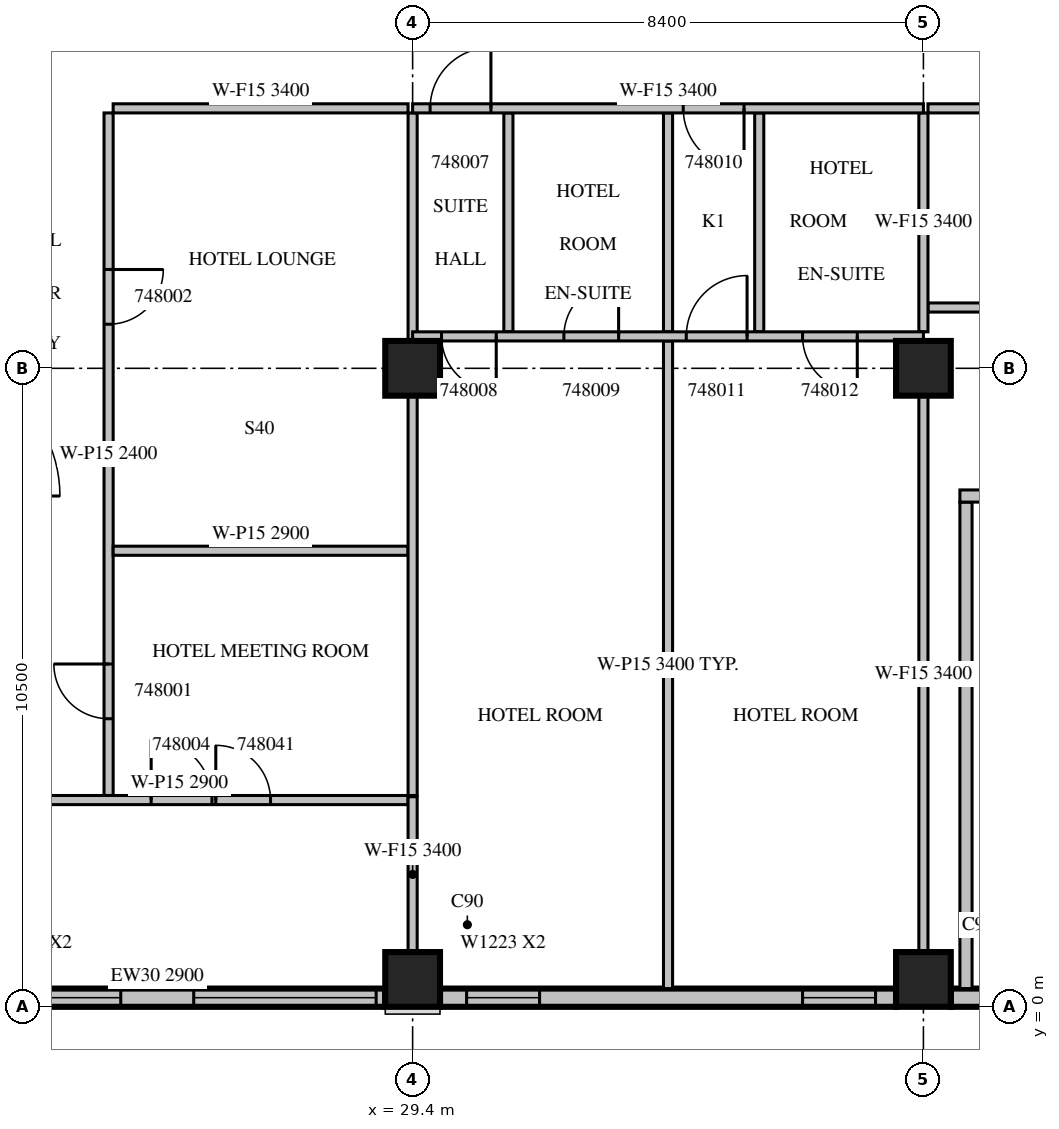
"""IFC4 building model, lengths in metres.
Left out: names, types, materials, properties, quantities, classifications, styles, units other than length and angle.
Written with IfcOpenShell. Run it as: python <this file> out.ifc"""

import sys

from ifc_helpers import new_model, si_unit, direction, frame, frame_2d, origin, origin_2d, place, context, subcontext, project, spatial, rectangle, extrude, source, transform, mapped, element, fill, save


model = new_model("IFC4")
c1 = context("Model", 3, precision=1e-05, world=origin(), true_north=direction((0.0, 1.0)))
c2 = subcontext(c1, "Body", "Model", "MODEL_VIEW")
j1 = project(units=[si_unit("LENGTHUNIT", "METRE"), si_unit("PLANEANGLEUNIT", "RADIAN")], contexts=[c1])
p1 = place(None, origin())
s1 = spatial("IfcSite", under=j1, at=p1, CompositionType="ELEMENT")
p2 = place(p1, origin())
s2 = spatial("IfcBuilding", under=s1, at=p2, CompositionType="ELEMENT")
p3 = place(p2, frame((0.0, 0.0, 215.8)))
s3 = spatial("IfcBuildingStorey", under=s2, at=p3, CompositionType="ELEMENT", Elevation=215.8)
m1 = source(origin(), c2, "Body", "SweptSolid", [
    extrude(rectangle(XDim=0.9, YDim=0.9, at=origin_2d()), origin(), (0.0, 0.0, 1.0), 3.8),
])
for number, where, z_axis, x_axis in (
    (1, (29.4, 0.45, 0.0), (0.0, 0.0, 1.0), (1.0, 0.0, 0.0)),
    (2, (37.8, 0.45, 0.0), (0.0, 0.0, 1.0), (1.0, 0.0, 0.0)),
    (3, (29.4, 10.5, 0.0), (0.0, 0.0, 1.0), (1.0, 0.0, 0.0)),
    (4, (37.8, 10.5, 0.0), (0.0, 0.0, 1.0), (1.0, 0.0, 0.0)),
):
    element("IfcColumn", number, at=place(p3, frame(where, z_axis=z_axis, x_axis=x_axis)), inside=s3, PredefinedType="COLUMN", context=c2, shape_type="MappedRepresentation", body=[
        mapped(m1, transform((0.0, 0.0, 0.0), scale=1.0)),
    ])
m2 = source(origin(), c2, "Body", "SweptSolid", [
    extrude(rectangle(XDim=7.5, YDim=0.3, at=frame_2d((3.75, 0.0))), origin(), (0.0, 0.0, 1.0), 2.9),
])
p4 = place(p3, frame((21.45, 0.15, 0.0), z_axis=(0.0, 0.0, 1.0), x_axis=(1.0, 0.0, 0.0)))
e5 = element("IfcWall", 5, at=p4, inside=s3, PredefinedType="STANDARD", context=c2, shape_type="MappedRepresentation", body=[
    mapped(m2, transform((0.0, 0.0, 0.0), scale=1.0)),
])
m3 = source(origin(), c2, "Body", "SweptSolid", [
    extrude(rectangle(XDim=3.0, YDim=2.3, at=frame_2d((1.5, 1.15))), frame((0.0, 0.16, 0.0), z_axis=(0.0, -1.0, 0.0), x_axis=(1.0, 0.0, 0.0)), (0.0, 0.0, 1.0), 0.32),
])
p5 = place(p4, frame((0.15, 0.0, 0.6)))
e6 = element("IfcOpeningElement", 6, at=p5, cuts=e5, PredefinedType="OPENING", context=c2, shape_type="MappedRepresentation", body=[
    mapped(m3, transform((0.0, 0.0, 0.0), scale=1.0)),
])
p6 = place(p4, frame((4.35, 0.0, 0.6)))
e7 = element("IfcOpeningElement", 7, at=p6, cuts=e5, PredefinedType="OPENING", context=c2, shape_type="MappedRepresentation", body=[
    mapped(m3, transform((0.0, 0.0, 0.0), scale=1.0)),
])
m4 = source(origin(), c2, "Body", "SweptSolid", [
    extrude(rectangle(XDim=7.5, YDim=0.3, at=frame_2d((3.75, 0.0))), origin(), (0.0, 0.0, 1.0), 3.4),
])
p7 = place(p3, frame((29.85, 0.15, 0.0), z_axis=(0.0, 0.0, 1.0), x_axis=(1.0, 0.0, 0.0)))
e8 = element("IfcWall", 8, at=p7, inside=s3, PredefinedType="STANDARD", context=c2, shape_type="MappedRepresentation", body=[
    mapped(m4, transform((0.0, 0.0, 0.0), scale=1.0)),
])
m5 = source(origin(), c2, "Body", "SweptSolid", [
    extrude(rectangle(XDim=1.2, YDim=2.3, at=frame_2d((0.6, 1.15))), frame((0.0, 0.16, 0.0), z_axis=(0.0, -1.0, 0.0), x_axis=(1.0, 0.0, 0.0)), (0.0, 0.0, 1.0), 0.32),
])
p8 = place(p7, frame((0.438, 0.0, 0.6)))
e9 = element("IfcOpeningElement", 9, at=p8, cuts=e8, PredefinedType="OPENING", context=c2, shape_type="MappedRepresentation", body=[
    mapped(m5, transform((0.0, 0.0, 0.0), scale=1.0)),
])
p9 = place(p7, frame((5.963, 0.0, 0.6)))
e10 = element("IfcOpeningElement", 10, at=p9, cuts=e8, PredefinedType="OPENING", context=c2, shape_type="MappedRepresentation", body=[
    mapped(m5, transform((0.0, 0.0, 0.0), scale=1.0)),
])
m6 = source(origin(), c2, "Body", "SweptSolid", [
    extrude(rectangle(XDim=1.95, YDim=0.3, at=frame_2d((0.975, 0.0))), origin(), (0.0, 0.0, 1.0), 3.4),
])
p10 = place(p3, frame((38.25, 0.15, 0.0), z_axis=(0.0, 0.0, 1.0), x_axis=(1.0, 0.0, 0.0)))
e11 = element("IfcWall", 11, at=p10, inside=s3, PredefinedType="STANDARD", context=c2, shape_type="MappedRepresentation", body=[
    mapped(m6, transform((0.0, 0.0, 0.0), scale=1.0)),
])
m7 = source(origin(), c2, "Body", "SweptSolid", [
    extrude(rectangle(XDim=8.0, YDim=0.2, at=frame_2d((4.0, 0.0))), origin(), (0.0, 0.0, 1.0), 3.4),
])
p11 = place(p3, frame((38.5, 0.3, 0.0), z_axis=(0.0, 0.0, 1.0), x_axis=(0.0, 1.0, 0.0)))
e12 = element("IfcWall", 12, at=p11, inside=s3, PredefinedType="PARTITIONING", context=c2, shape_type="MappedRepresentation", body=[
    mapped(m7, transform((0.0, 0.0, 0.0), scale=1.0)),
])
m8 = source(origin(), c2, "Body", "SweptSolid", [
    extrude(rectangle(XDim=5.45, YDim=0.2, at=frame_2d((2.725, 0.0))), origin(), (0.0, 0.0, 1.0), 3.4),
])
p12 = place(p3, frame((38.4, 8.4, 0.0), z_axis=(0.0, 0.0, 1.0), x_axis=(1.0, 0.0, 0.0)))
e13 = element("IfcWall", 13, at=p12, inside=s3, PredefinedType="PARTITIONING", context=c2, shape_type="MappedRepresentation", body=[
    mapped(m8, transform((0.0, 0.0, 0.0), scale=1.0)),
])
m9 = source(origin(), c2, "Body", "SweptSolid", [
    extrude(rectangle(XDim=1.2, YDim=2.1, at=frame_2d((0.6, 1.05))), frame((0.0, 0.11, 0.0), z_axis=(0.0, -1.0, 0.0), x_axis=(1.0, 0.0, 0.0)), (0.0, 0.0, 1.0), 0.22),
])
p13 = place(p12, frame((0.4, 0.0, 0.0)))
e14 = element("IfcOpeningElement", 14, at=p13, cuts=e13, PredefinedType="OPENING", context=c2, shape_type="MappedRepresentation", body=[
    mapped(m9, transform((0.0, 0.0, 0.0), scale=1.0)),
])
m10 = source(origin(), c2, "Body", "SweptSolid", [
    extrude(rectangle(XDim=0.9, YDim=2.1, at=frame_2d((0.45, 1.05))), frame((0.0, 0.11, 0.0), z_axis=(0.0, -1.0, 0.0), x_axis=(1.0, 0.0, 0.0)), (0.0, 0.0, 1.0), 0.22),
])
p14 = place(p12, frame((3.25, 0.0, 0.0)))
e15 = element("IfcOpeningElement", 15, at=p14, cuts=e13, PredefinedType="OPENING", context=c2, shape_type="MappedRepresentation", body=[
    mapped(m10, transform((0.0, 0.0, 0.0), scale=1.0)),
])
m11 = source(origin(), c2, "Body", "SweptSolid", [
    extrude(rectangle(XDim=11.225, YDim=0.15, at=frame_2d((5.612, 0.0))), origin(), (0.0, 0.0, 1.0), 2.4),
])
p15 = place(p3, frame((24.4, 14.7, 0.0), z_axis=(0.0, 0.0, 1.0), x_axis=(0.0, -1.0, 0.0)))
e16 = element("IfcWall", 16, at=p15, inside=s3, PredefinedType="PARTITIONING", context=c2, shape_type="MappedRepresentation", body=[
    mapped(m11, transform((0.0, 0.0, 0.0), scale=1.0)),
])
m12 = source(origin(), c2, "Body", "SweptSolid", [
    extrude(rectangle(XDim=0.9, YDim=2.1, at=frame_2d((0.45, 1.05))), frame((0.0, 0.085, 0.0), z_axis=(0.0, -1.0, 0.0), x_axis=(1.0, 0.0, 0.0)), (0.0, 0.0, 1.0), 0.17),
])
p16 = place(p15, frame((9.062, 0.0, 0.0)))
e17 = element("IfcOpeningElement", 17, at=p16, cuts=e16, PredefinedType="OPENING", context=c2, shape_type="MappedRepresentation", body=[
    mapped(m12, transform((0.0, 0.0, 0.0), scale=1.0)),
])
p17 = place(p15, frame((2.575, 0.0, 0.0)))
e18 = element("IfcOpeningElement", 18, at=p17, cuts=e16, PredefinedType="OPENING", context=c2, shape_type="MappedRepresentation", body=[
    mapped(m12, transform((0.0, 0.0, 0.0), scale=1.0)),
])
m13 = source(origin(), c2, "Body", "SweptSolid", [
    extrude(rectangle(XDim=4.85, YDim=0.15, at=frame_2d((2.425, 0.0))), origin(), (0.0, 0.0, 1.0), 2.9),
])
p18 = place(p3, frame((29.325, 7.5, 0.0), z_axis=(0.0, 0.0, 1.0), x_axis=(-1.0, 0.0, 0.0)))
e19 = element("IfcWall", 19, at=p18, inside=s3, PredefinedType="PARTITIONING", context=c2, shape_type="MappedRepresentation", body=[
    mapped(m13, transform((0.0, 0.0, 0.0), scale=1.0)),
])
m14 = source(origin(), c2, "Body", "SweptSolid", [
    extrude(rectangle(XDim=4.85, YDim=0.15, at=frame_2d((2.425, 0.0))), origin(), (0.0, 0.0, 1.0), 3.4),
])
p19 = place(p3, frame((29.325, 14.775, 0.0), z_axis=(0.0, 0.0, 1.0), x_axis=(-1.0, 0.0, 0.0)))
e20 = element("IfcWall", 20, at=p19, inside=s3, PredefinedType="PARTITIONING", context=c2, shape_type="MappedRepresentation", body=[
    mapped(m14, transform((0.0, 0.0, 0.0), scale=1.0)),
])
m15 = source(origin(), c2, "Body", "SweptSolid", [
    extrude(rectangle(XDim=6.576, YDim=0.15, at=frame_2d((3.288, 0.0))), origin(), (0.0, 0.0, 1.0), 3.4),
])
p20 = place(p3, frame((29.4, 3.475, 0.0), z_axis=(0.0, 0.0, 1.0), x_axis=(0.0, 1.0, 0.0)))
e21 = element("IfcWall", 21, at=p20, inside=s3, PredefinedType="PARTITIONING", context=c2, shape_type="MappedRepresentation", body=[
    mapped(m15, transform((0.0, 0.0, 0.0), scale=1.0)),
])
m16 = source(origin(), c2, "Body", "SweptSolid", [
    extrude(rectangle(XDim=3.751, YDim=0.15, at=frame_2d((1.875, 0.0))), origin(), (0.0, 0.0, 1.0), 3.4),
])
p21 = place(p3, frame((29.4, 10.949, 0.0), z_axis=(0.0, 0.0, 1.0), x_axis=(0.0, 1.0, 0.0)))
e22 = element("IfcWall", 22, at=p21, inside=s3, PredefinedType="PARTITIONING", context=c2, shape_type="MappedRepresentation", body=[
    mapped(m16, transform((0.0, 0.0, 0.0), scale=1.0)),
])
m17 = source(origin(), c2, "Body", "SweptSolid", [
    extrude(rectangle(XDim=7.525, YDim=0.15, at=frame_2d((3.763, 0.0))), origin(), (0.0, 0.0, 1.0), 2.9),
])
p22 = place(p3, frame((21.8, 3.4, 0.0), z_axis=(0.0, 0.0, 1.0), x_axis=(1.0, 0.0, 0.0)))
e23 = element("IfcWall", 23, at=p22, inside=s3, PredefinedType="PARTITIONING", context=c2, shape_type="MappedRepresentation", body=[
    mapped(m17, transform((0.0, 0.0, 0.0), scale=1.0)),
])
m18 = source(origin(), c2, "Body", "SweptSolid", [
    extrude(rectangle(XDim=1.0, YDim=2.1, at=frame_2d((0.5, 1.05))), frame((0.0, 0.085, 0.0), z_axis=(0.0, -1.0, 0.0), x_axis=(1.0, 0.0, 0.0)), (0.0, 0.0, 1.0), 0.17),
])
p23 = place(p22, frame((3.3, 0.0, 0.0)))
e24 = element("IfcOpeningElement", 24, at=p23, cuts=e23, PredefinedType="OPENING", context=c2, shape_type="MappedRepresentation", body=[
    mapped(m18, transform((0.0, 0.0, 0.0), scale=1.0)),
])
p24 = place(p22, frame((4.363, 0.0, 0.0)))
e25 = element("IfcOpeningElement", 25, at=p24, cuts=e23, PredefinedType="OPENING", context=c2, shape_type="MappedRepresentation", body=[
    mapped(m12, transform((0.0, 0.0, 0.0), scale=1.0)),
])
m19 = source(origin(), c2, "Body", "SweptSolid", [
    extrude(rectangle(XDim=6.45, YDim=0.15, at=frame_2d((3.225, 0.0))), origin(), (0.0, 0.0, 1.0), 3.4),
])
p25 = place(p3, frame((37.875, 11.5, 0.0), z_axis=(0.0, 0.0, 1.0), x_axis=(1.0, 0.0, 0.0)))
e26 = element("IfcWall", 26, at=p25, inside=s3, PredefinedType="PARTITIONING", context=c2, shape_type="MappedRepresentation", body=[
    mapped(m19, transform((0.0, 0.0, 0.0), scale=1.0)),
])
p26 = place(p3, frame((44.325, 14.775, 0.0), z_axis=(0.0, 0.0, 1.0), x_axis=(-1.0, 0.0, 0.0)))
e27 = element("IfcWall", 27, at=p26, inside=s3, PredefinedType="PARTITIONING", context=c2, shape_type="MappedRepresentation", body=[
    mapped(m19, transform((0.0, 0.0, 0.0), scale=1.0)),
])
p27 = place(p26, frame((2.812, 0.0, 0.0)))
e28 = element("IfcOpeningElement", 28, at=p27, cuts=e27, PredefinedType="OPENING", context=c2, shape_type="MappedRepresentation", body=[
    mapped(m12, transform((0.0, 0.0, 0.0), scale=1.0)),
])
m20 = source(origin(), c2, "Body", "SweptSolid", [
    extrude(rectangle(XDim=10.65, YDim=0.15, at=frame_2d((5.325, 0.0))), origin(), (0.0, 0.0, 1.0), 3.4),
])
p28 = place(p3, frame((33.6, 0.3, 0.0), z_axis=(0.0, 0.0, 1.0), x_axis=(0.0, 1.0, 0.0)))
e29 = element("IfcWall", 29, at=p28, inside=s3, PredefinedType="PARTITIONING", context=c2, shape_type="MappedRepresentation", body=[
    mapped(m20, transform((0.0, 0.0, 0.0), scale=1.0)),
])
m21 = source(origin(), c2, "Body", "SweptSolid", [
    extrude(rectangle(XDim=3.6, YDim=0.15, at=frame_2d((1.8, 0.0))), origin(), (0.0, 0.0, 1.0), 3.4),
])
for number, where, z_axis, x_axis in (
    (30, (30.975, 11.1, 0.0), (0.0, 0.0, 1.0), (0.0, 1.0, 0.0)),
    (31, (33.6, 11.1, 0.0), (0.0, 0.0, 1.0), (0.0, 1.0, 0.0)),
    (32, (35.1, 11.1, 0.0), (0.0, 0.0, 1.0), (0.0, 1.0, 0.0)),
):
    element("IfcWall", number, at=place(p3, frame(where, z_axis=z_axis, x_axis=x_axis)), inside=s3, PredefinedType="PARTITIONING", context=c2, shape_type="MappedRepresentation", body=[
        mapped(m21, transform((0.0, 0.0, 0.0), scale=1.0)),
    ])
m22 = source(origin(), c2, "Body", "SweptSolid", [
    extrude(rectangle(XDim=2.556, YDim=0.15, at=frame_2d((1.278, 0.0))), origin(), (0.0, 0.0, 1.0), 3.4),
])
p29 = place(p3, frame((29.4, 0.899, 0.0), z_axis=(0.0, 0.0, 1.0), x_axis=(0.0, 1.0, 0.0)))
e33 = element("IfcWall", 33, at=p29, inside=s3, PredefinedType="PARTITIONING", context=c2, shape_type="MappedRepresentation", body=[
    mapped(m22, transform((0.0, 0.0, 0.0), scale=1.0)),
])
m23 = source(origin(), c2, "Body", "SweptSolid", [
    extrude(rectangle(XDim=9.152, YDim=0.15, at=frame_2d((4.576, 0.0))), origin(), (0.0, 0.0, 1.0), 3.4),
])
p30 = place(p3, frame((37.8, 0.899, 0.0), z_axis=(0.0, 0.0, 1.0), x_axis=(0.0, 1.0, 0.0)))
e34 = element("IfcWall", 34, at=p30, inside=s3, PredefinedType="PARTITIONING", context=c2, shape_type="MappedRepresentation", body=[
    mapped(m23, transform((0.0, 0.0, 0.0), scale=1.0)),
])
p31 = place(p3, frame((37.8, 11.1, 0.0), z_axis=(0.0, 0.0, 1.0), x_axis=(0.0, 1.0, 0.0)))
e35 = element("IfcWall", 35, at=p31, inside=s3, PredefinedType="PARTITIONING", context=c2, shape_type="MappedRepresentation", body=[
    mapped(m21, transform((0.0, 0.0, 0.0), scale=1.0)),
])
m24 = source(origin(), c2, "Body", "SweptSolid", [
    extrude(rectangle(XDim=8.4, YDim=0.15, at=frame_2d((4.2, 0.0))), origin(), (0.0, 0.0, 1.0), 3.4),
])
p32 = place(p3, frame((37.8, 11.025, 0.0), z_axis=(0.0, 0.0, 1.0), x_axis=(-1.0, 0.0, 0.0)))
e36 = element("IfcWall", 36, at=p32, inside=s3, PredefinedType="PARTITIONING", context=c2, shape_type="MappedRepresentation", body=[
    mapped(m24, transform((0.0, 0.0, 0.0), scale=1.0)),
])
p33 = place(p32, frame((7.025, 0.0, 0.0)))
e37 = element("IfcOpeningElement", 37, at=p33, cuts=e36, PredefinedType="OPENING", context=c2, shape_type="MappedRepresentation", body=[
    mapped(m12, transform((0.0, 0.0, 0.0), scale=1.0)),
])
p34 = place(p32, frame((5.013, 0.0, 0.0)))
e38 = element("IfcOpeningElement", 38, at=p34, cuts=e36, PredefinedType="OPENING", context=c2, shape_type="MappedRepresentation", body=[
    mapped(m12, transform((0.0, 0.0, 0.0), scale=1.0)),
])
p35 = place(p32, frame((2.9, 0.0, 0.0)))
e39 = element("IfcOpeningElement", 39, at=p35, cuts=e36, PredefinedType="OPENING", context=c2, shape_type="MappedRepresentation", body=[
    mapped(m18, transform((0.0, 0.0, 0.0), scale=1.0)),
])
p36 = place(p32, frame((1.087, 0.0, 0.0)))
e40 = element("IfcOpeningElement", 40, at=p36, cuts=e36, PredefinedType="OPENING", context=c2, shape_type="MappedRepresentation", body=[
    mapped(m12, transform((0.0, 0.0, 0.0), scale=1.0)),
])
p37 = place(p3, frame((37.8, 14.775, 0.0), z_axis=(0.0, 0.0, 1.0), x_axis=(-1.0, 0.0, 0.0)))
e41 = element("IfcWall", 41, at=p37, inside=s3, PredefinedType="PARTITIONING", context=c2, shape_type="MappedRepresentation", body=[
    mapped(m24, transform((0.0, 0.0, 0.0), scale=1.0)),
])
p38 = place(p37, frame((7.112, 0.0, 0.0)))
e42 = element("IfcOpeningElement", 42, at=p38, cuts=e41, PredefinedType="OPENING", context=c2, shape_type="MappedRepresentation", body=[
    mapped(m18, transform((0.0, 0.0, 0.0), scale=1.0)),
])
p39 = place(p37, frame((2.95, 0.0, 0.0)))
e43 = element("IfcOpeningElement", 43, at=p39, cuts=e41, PredefinedType="OPENING", context=c2, shape_type="MappedRepresentation", body=[
    mapped(m18, transform((0.0, 0.0, 0.0), scale=1.0)),
])
m25 = source(origin(), c2, "Body", "SweptSolid", [
    extrude(rectangle(XDim=3.0, YDim=2.3, at=frame_2d((1.5, 1.15))), frame((0.0, 0.03, 0.0), z_axis=(0.0, -1.0, 0.0), x_axis=(1.0, 0.0, 0.0)), (0.0, 0.0, 1.0), 0.06),
])
p40 = place(p5, origin())
e44 = element("IfcWindow", 44, at=p40, inside=s3, PartitioningType="SINGLE_PANEL", PredefinedType="WINDOW", context=c2, shape_type="MappedRepresentation", body=[
    mapped(m25, transform((0.0, 0.0, 0.0), scale=1.0)),
])
fill(e6, e44)
p41 = place(p6, origin())
e45 = element("IfcWindow", 45, at=p41, inside=s3, PartitioningType="SINGLE_PANEL", PredefinedType="WINDOW", context=c2, shape_type="MappedRepresentation", body=[
    mapped(m25, transform((0.0, 0.0, 0.0), scale=1.0)),
])
fill(e7, e45)
m26 = source(origin(), c2, "Body", "SweptSolid", [
    extrude(rectangle(XDim=1.2, YDim=2.3, at=frame_2d((0.6, 1.15))), frame((0.0, 0.03, 0.0), z_axis=(0.0, -1.0, 0.0), x_axis=(1.0, 0.0, 0.0)), (0.0, 0.0, 1.0), 0.06),
])
p42 = place(p8, origin())
e46 = element("IfcWindow", 46, at=p42, inside=s3, PartitioningType="SINGLE_PANEL", PredefinedType="WINDOW", context=c2, shape_type="MappedRepresentation", body=[
    mapped(m26, transform((0.0, 0.0, 0.0), scale=1.0)),
])
fill(e9, e46)
p43 = place(p9, origin())
e47 = element("IfcWindow", 47, at=p43, inside=s3, PartitioningType="SINGLE_PANEL", PredefinedType="WINDOW", context=c2, shape_type="MappedRepresentation", body=[
    mapped(m26, transform((0.0, 0.0, 0.0), scale=1.0)),
])
fill(e10, e47)
m27 = source(origin(), c2, "Body", "SweptSolid", [
    extrude(rectangle(XDim=0.9, YDim=2.1, at=frame_2d((0.45, 1.05))), frame((0.0, 0.025, 0.0), z_axis=(0.0, -1.0, 0.0), x_axis=(1.0, 0.0, 0.0)), (0.0, 0.0, 1.0), 0.05),
])
p44 = place(p16, origin())
e48 = element("IfcDoor", 48, at=p44, inside=s3, OperationType="SINGLE_SWING_RIGHT", PredefinedType="DOOR", context=c2, shape_type="MappedRepresentation", body=[
    mapped(m27, transform((0.0, 0.0, 0.0), scale=1.0)),
])
fill(e17, e48)
p45 = place(p17, origin())
e49 = element("IfcDoor", 49, at=p45, inside=s3, OperationType="SINGLE_SWING_LEFT", PredefinedType="DOOR", context=c2, shape_type="MappedRepresentation", body=[
    mapped(m27, transform((0.0, 0.0, 0.0), scale=1.0)),
])
fill(e18, e49)
m28 = source(origin(), c2, "Body", "SweptSolid", [
    extrude(rectangle(XDim=1.0, YDim=2.1, at=frame_2d((0.5, 1.05))), frame((0.0, 0.025, 0.0), z_axis=(0.0, -1.0, 0.0), x_axis=(1.0, 0.0, 0.0)), (0.0, 0.0, 1.0), 0.05),
])
p46 = place(p23, origin())
e50 = element("IfcDoor", 50, at=p46, inside=s3, OperationType="SINGLE_SWING_LEFT", PredefinedType="DOOR", context=c2, shape_type="MappedRepresentation", body=[
    mapped(m28, transform((0.0, 0.0, 0.0), scale=1.0)),
])
fill(e24, e50)
p47 = place(p38, origin())
e51 = element("IfcDoor", 51, at=p47, inside=s3, OperationType="SINGLE_SWING_RIGHT", PredefinedType="DOOR", context=c2, shape_type="MappedRepresentation", body=[
    mapped(m28, transform((0.0, 0.0, 0.0), scale=1.0)),
])
fill(e42, e51)
p48 = place(p33, origin())
e52 = element("IfcDoor", 52, at=p48, inside=s3, OperationType="SINGLE_SWING_LEFT", PredefinedType="DOOR", context=c2, shape_type="MappedRepresentation", body=[
    mapped(m27, transform((0.0, 0.0, 0.0), scale=1.0)),
])
fill(e37, e52)
p49 = place(p34, origin())
e53 = element("IfcDoor", 53, at=p49, inside=s3, OperationType="SINGLE_SWING_RIGHT", PredefinedType="DOOR", context=c2, shape_type="MappedRepresentation", body=[
    mapped(m27, transform((0.0, 0.0, 0.0), scale=1.0)),
])
fill(e38, e53)
p50 = place(p39, origin())
e54 = element("IfcDoor", 54, at=p50, inside=s3, OperationType="SINGLE_SWING_LEFT", PredefinedType="DOOR", context=c2, shape_type="MappedRepresentation", body=[
    mapped(m28, transform((0.0, 0.0, 0.0), scale=1.0)),
])
fill(e43, e54)
p51 = place(p35, origin())
e55 = element("IfcDoor", 55, at=p51, inside=s3, OperationType="SINGLE_SWING_RIGHT", PredefinedType="DOOR", context=c2, shape_type="MappedRepresentation", body=[
    mapped(m28, transform((0.0, 0.0, 0.0), scale=1.0)),
])
fill(e39, e55)
p52 = place(p36, origin())
e56 = element("IfcDoor", 56, at=p52, inside=s3, OperationType="SINGLE_SWING_LEFT", PredefinedType="DOOR", context=c2, shape_type="MappedRepresentation", body=[
    mapped(m27, transform((0.0, 0.0, 0.0), scale=1.0)),
])
fill(e40, e56)
p53 = place(p24, origin())
e57 = element("IfcDoor", 57, at=p53, inside=s3, OperationType="SINGLE_SWING_LEFT", PredefinedType="DOOR", context=c2, shape_type="MappedRepresentation", body=[
    mapped(m27, transform((0.0, 0.0, 0.0), scale=1.0)),
])
fill(e25, e57)
save(model, sys.argv[1])
